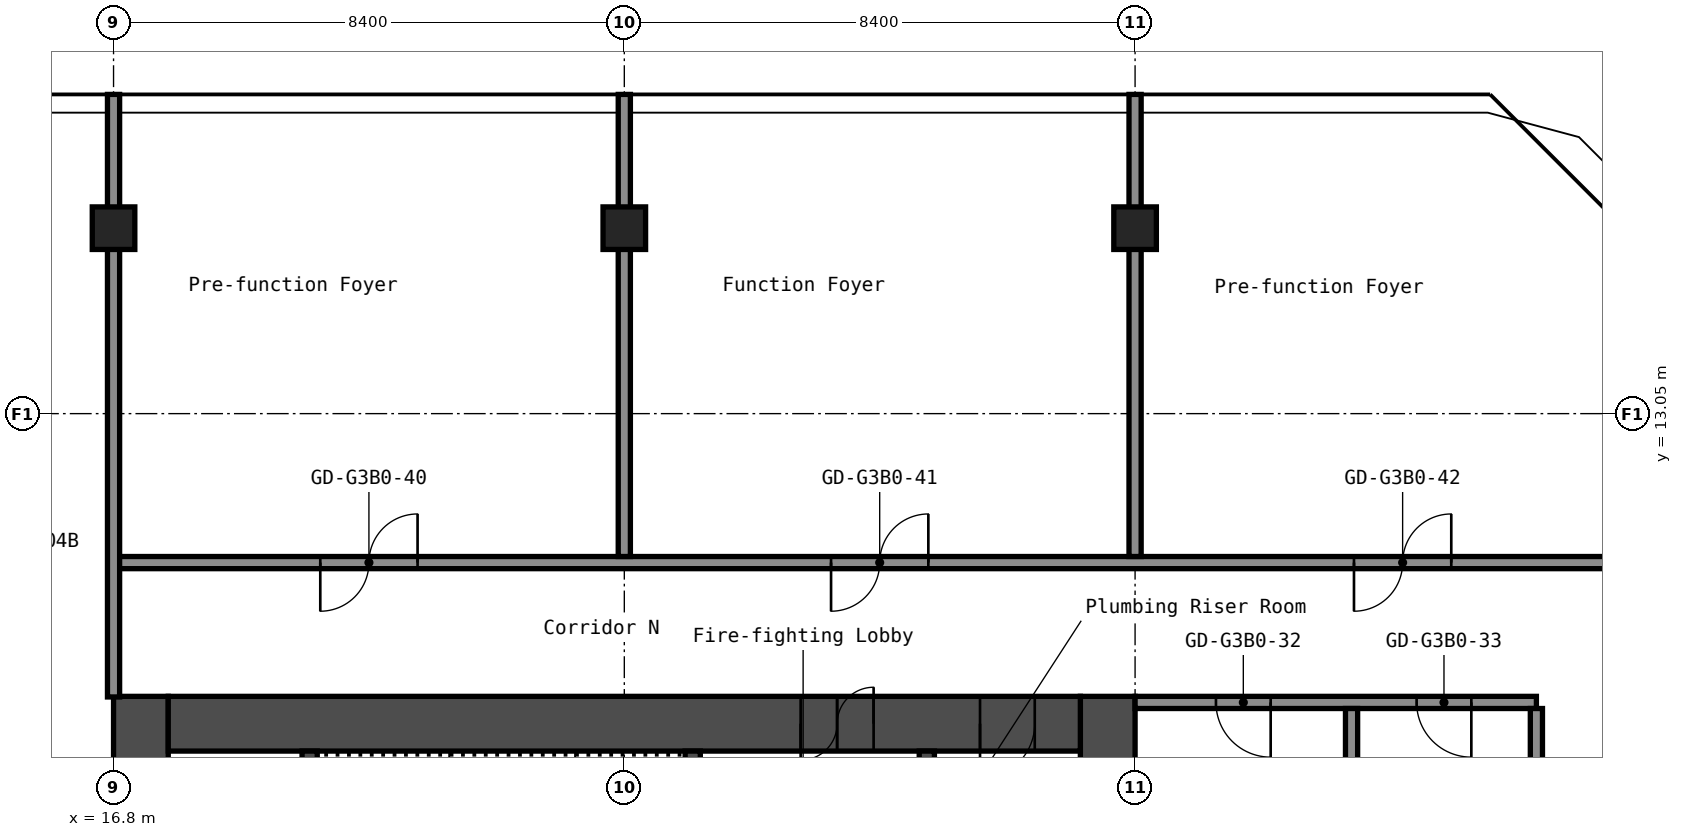
"""IFC4 building model, lengths in metres.
Left out: names, types, materials, properties, quantities, classifications, styles, units other than length and angle.
Written with IfcOpenShell. Run it as: python <this file> out.ifc"""

import sys

from ifc_helpers import new_model, si_unit, direction, frame, frame_2d, origin, origin_2d, place, context, subcontext, project, spatial, rectangle, hollow_rectangle, extrude, element, fill, save


model = new_model("IFC4")
c1 = context("Model", 3, precision=1e-05, world=origin(), true_north=direction((0.0, 1.0)))
c2 = subcontext(c1, "Body", "Model", "MODEL_VIEW")
j1 = project(units=[si_unit("LENGTHUNIT", "METRE"), si_unit("PLANEANGLEUNIT", "RADIAN")], contexts=[c1])
p1 = place(None, origin())
s1 = spatial("IfcSite", under=j1, at=p1, CompositionType="ELEMENT")
p2 = place(p1, origin())
s2 = spatial("IfcBuilding", under=s1, at=p2, CompositionType="ELEMENT")
p3 = place(p2, frame((0.0, 0.0, 134.2)))
s3 = spatial("IfcBuildingStorey", under=s2, at=p3, CompositionType="ELEMENT", Elevation=134.2)
for number, where, z_axis, x_axis in (
    (1, (16.8, 16.1, 0.0), (0.0, 0.0, 1.0), (1.0, 0.0, 0.0)),
    (2, (25.2, 16.1, 0.0), (0.0, 0.0, 1.0), (1.0, 0.0, 0.0)),
    (3, (33.6, 16.1, 0.0), (0.0, 0.0, 1.0), (1.0, 0.0, 0.0)),
):
    element("IfcColumn", number, at=place(p3, frame(where, z_axis=z_axis, x_axis=x_axis)), inside=s3, PredefinedType="COLUMN", context=c2, shape_type="SweptSolid", body=[
        extrude(hollow_rectangle(XDim=0.7, YDim=0.7, WallThickness=0.028, at=origin_2d()), origin(), (0.0, 0.0, 1.0), 2.75),
    ])
p4 = place(p3, frame((17.25, -8.4, 0.0), z_axis=(0.0, 0.0, 1.0), x_axis=(0.0, 1.0, 0.0)))
e4 = element("IfcWall", 4, at=p4, inside=s3, PredefinedType="SHEAR", context=c2, shape_type="SweptSolid", body=[
    extrude(rectangle(XDim=16.8, YDim=0.9, at=frame_2d((8.4, 0.0))), origin(), (0.0, 0.0, 1.0), 2.75),
])
p5 = place(p4, frame((7.1, 0.0, 0.0)))
e5 = element("IfcOpeningElement", 5, at=p5, cuts=e4, PredefinedType="OPENING", context=c2, shape_type="SweptSolid", body=[
    extrude(rectangle(XDim=1.6, YDim=2.1, at=frame_2d((0.8, 1.05))), frame((0.0, 0.46, 0.0), z_axis=(0.0, -1.0, 0.0), x_axis=(1.0, 0.0, 0.0)), (0.0, 0.0, 1.0), 0.92),
])
p6 = place(p3, frame((33.15, -8.4, 0.0), z_axis=(0.0, 0.0, 1.0), x_axis=(0.0, 1.0, 0.0)))
e6 = element("IfcWall", 6, at=p6, inside=s3, PredefinedType="SHEAR", context=c2, shape_type="SweptSolid", body=[
    extrude(rectangle(XDim=16.8, YDim=0.9, at=frame_2d((8.4, 0.0))), origin(), (0.0, 0.0, 1.0), 2.75),
])
p7 = place(p3, frame((17.7, 7.95, 0.0), z_axis=(0.0, 0.0, 1.0), x_axis=(1.0, 0.0, 0.0)))
e7 = element("IfcWall", 7, at=p7, inside=s3, PredefinedType="SHEAR", context=c2, shape_type="SweptSolid", body=[
    extrude(rectangle(XDim=15.0, YDim=0.9, at=frame_2d((7.5, 0.0))), origin(), (0.0, 0.0, 1.0), 2.75),
])
p8 = place(p7, frame((10.4, 0.0, 0.0)))
e8 = element("IfcOpeningElement", 8, at=p8, cuts=e7, PredefinedType="OPENING", context=c2, shape_type="SweptSolid", body=[
    extrude(rectangle(XDim=1.2, YDim=2.1, at=frame_2d((0.6, 1.05))), frame((0.0, 0.46, 0.0), z_axis=(0.0, -1.0, 0.0), x_axis=(1.0, 0.0, 0.0)), (0.0, 0.0, 1.0), 0.92),
])
p9 = place(p7, frame((13.35, 0.0, 0.0)))
e9 = element("IfcOpeningElement", 9, at=p9, cuts=e7, PredefinedType="OPENING", context=c2, shape_type="SweptSolid", body=[
    extrude(rectangle(XDim=0.9, YDim=2.1, at=frame_2d((0.45, 1.05))), frame((0.0, 0.46, 0.0), z_axis=(0.0, -1.0, 0.0), x_axis=(1.0, 0.0, 0.0)), (0.0, 0.0, 1.0), 0.92),
])
p10 = place(p3, frame((20.025, 1.2, 0.0), z_axis=(0.0, 0.0, 1.0), x_axis=(0.0, 1.0, 0.0)))
e10 = element("IfcWall", 10, at=p10, inside=s3, PredefinedType="SHEAR", context=c2, shape_type="SweptSolid", body=[
    extrude(rectangle(XDim=6.3, YDim=0.25, at=frame_2d((3.15, 0.0))), origin(), (0.0, 0.0, 1.0), 2.75),
])
p11 = place(p3, frame((26.325, 3.75, 0.0), z_axis=(0.0, 0.0, 1.0), x_axis=(0.0, 1.0, 0.0)))
e11 = element("IfcWall", 11, at=p11, inside=s3, PredefinedType="SHEAR", context=c2, shape_type="SweptSolid", body=[
    extrude(rectangle(XDim=3.75, YDim=0.25, at=frame_2d((1.875, 0.0))), origin(), (0.0, 0.0, 1.0), 2.75),
])
p12 = place(p11, frame((1.25, 0.0, 0.0)))
e12 = element("IfcOpeningElement", 12, at=p12, cuts=e11, PredefinedType="OPENING", context=c2, shape_type="SweptSolid", body=[
    extrude(rectangle(XDim=1.2, YDim=2.1, at=frame_2d((0.6, 1.05))), frame((0.0, 0.135, 0.0), z_axis=(0.0, -1.0, 0.0), x_axis=(1.0, 0.0, 0.0)), (0.0, 0.0, 1.0), 0.27),
])
p13 = place(p3, frame((30.175, 1.45, 0.0), z_axis=(0.0, 0.0, 1.0), x_axis=(0.0, 1.0, 0.0)))
e13 = element("IfcWall", 13, at=p13, inside=s3, PredefinedType="SHEAR", context=c2, shape_type="SweptSolid", body=[
    extrude(rectangle(XDim=6.05, YDim=0.25, at=frame_2d((3.025, 0.0))), origin(), (0.0, 0.0, 1.0), 2.75),
])
p14 = place(p13, frame((2.625, 0.0, 0.0)))
e14 = element("IfcOpeningElement", 14, at=p14, cuts=e13, PredefinedType="OPENING", context=c2, shape_type="SweptSolid", body=[
    extrude(rectangle(XDim=1.1, YDim=2.1, at=frame_2d((0.55, 1.05))), frame((0.0, 0.135, 0.0), z_axis=(0.0, -1.0, 0.0), x_axis=(1.0, 0.0, 0.0)), (0.0, 0.0, 1.0), 0.27),
])
p15 = place(p3, frame((33.6, 8.3, 0.0), z_axis=(0.0, 0.0, 1.0), x_axis=(1.0, 0.0, 0.0)))
e15 = element("IfcWall", 15, at=p15, inside=s3, PredefinedType="PARTITIONING", context=c2, shape_type="SweptSolid", body=[
    extrude(rectangle(XDim=6.6, YDim=0.2, at=frame_2d((3.3, 0.0))), origin(), (0.0, 0.0, 1.0), 2.75),
])
p16 = place(p15, frame((1.33, 0.0, 0.0)))
e16 = element("IfcOpeningElement", 16, at=p16, cuts=e15, PredefinedType="OPENING", context=c2, shape_type="SweptSolid", body=[
    extrude(rectangle(XDim=0.9, YDim=2.1, at=frame_2d((0.45, 1.05))), frame((0.0, 0.11, 0.0), z_axis=(0.0, -1.0, 0.0), x_axis=(1.0, 0.0, 0.0)), (0.0, 0.0, 1.0), 0.22),
])
p17 = place(p15, frame((4.63, 0.0, 0.0)))
e17 = element("IfcOpeningElement", 17, at=p17, cuts=e15, PredefinedType="OPENING", context=c2, shape_type="SweptSolid", body=[
    extrude(rectangle(XDim=0.9, YDim=2.1, at=frame_2d((0.45, 1.05))), frame((0.0, 0.11, 0.0), z_axis=(0.0, -1.0, 0.0), x_axis=(1.0, 0.0, 0.0)), (0.0, 0.0, 1.0), 0.22),
])
p18 = place(p3, frame((16.8, 10.6, 0.0), z_axis=(0.0, 0.0, 1.0), x_axis=(1.0, 0.0, 0.0)))
e18 = element("IfcWall", 18, at=p18, inside=s3, PredefinedType="PARTITIONING", context=c2, shape_type="SweptSolid", body=[
    extrude(rectangle(XDim=25.9, YDim=0.2, at=frame_2d((12.95, 0.0))), origin(), (0.0, 0.0, 1.0), 2.75),
])
p19 = place(p18, frame((3.4, 0.0, 0.0)))
e19 = element("IfcOpeningElement", 19, at=p19, cuts=e18, PredefinedType="OPENING", context=c2, shape_type="SweptSolid", body=[
    extrude(rectangle(XDim=1.6, YDim=2.1, at=frame_2d((0.8, 1.05))), frame((0.0, 0.11, 0.0), z_axis=(0.0, -1.0, 0.0), x_axis=(1.0, 0.0, 0.0)), (0.0, 0.0, 1.0), 0.22),
])
p20 = place(p18, frame((11.8, 0.0, 0.0)))
e20 = element("IfcOpeningElement", 20, at=p20, cuts=e18, PredefinedType="OPENING", context=c2, shape_type="SweptSolid", body=[
    extrude(rectangle(XDim=1.6, YDim=2.1, at=frame_2d((0.8, 1.05))), frame((0.0, 0.11, 0.0), z_axis=(0.0, -1.0, 0.0), x_axis=(1.0, 0.0, 0.0)), (0.0, 0.0, 1.0), 0.22),
])
p21 = place(p18, frame((20.4, 0.0, 0.0)))
e21 = element("IfcOpeningElement", 21, at=p21, cuts=e18, PredefinedType="OPENING", context=c2, shape_type="SweptSolid", body=[
    extrude(rectangle(XDim=1.6, YDim=2.1, at=frame_2d((0.8, 1.05))), frame((0.0, 0.11, 0.0), z_axis=(0.0, -1.0, 0.0), x_axis=(1.0, 0.0, 0.0)), (0.0, 0.0, 1.0), 0.22),
])
p22 = place(p3, frame((16.8, 8.39, 0.0), z_axis=(0.0, 0.0, 1.0), x_axis=(0.0, 1.0, 0.0)))
e22 = element("IfcWall", 22, at=p22, inside=s3, PredefinedType="PARTITIONING", context=c2, shape_type="SweptSolid", body=[
    extrude(rectangle(XDim=9.91, YDim=0.2, at=frame_2d((4.955, 0.0))), origin(), (0.0, 0.0, 1.0), 2.75),
])
for number, where, z_axis, x_axis in (
    (23, (25.2, 10.7, 0.0), (0.0, 0.0, 1.0), (0.0, 1.0, 0.0)),
    (24, (33.6, 10.7, 0.0), (0.0, 0.0, 1.0), (0.0, 1.0, 0.0)),
):
    element("IfcWall", number, at=place(p3, frame(where, z_axis=z_axis, x_axis=x_axis)), inside=s3, PredefinedType="PARTITIONING", context=c2, shape_type="SweptSolid", body=[
        extrude(rectangle(XDim=7.6, YDim=0.2, at=frame_2d((3.8, 0.0))), origin(), (0.0, 0.0, 1.0), 2.75),
    ])
p23 = place(p3, frame((37.16, 0.0, 0.0), z_axis=(0.0, 0.0, 1.0), x_axis=(0.0, 1.0, 0.0)))
e25 = element("IfcWall", 25, at=p23, inside=s3, PredefinedType="PARTITIONING", context=c2, shape_type="SweptSolid", body=[
    extrude(rectangle(XDim=8.2, YDim=0.2, at=frame_2d((4.1, 0.0))), origin(), (0.0, 0.0, 1.0), 2.75),
])
p24 = place(p3, frame((40.2, -8.2, 0.0), z_axis=(0.0, 0.0, 1.0), x_axis=(0.0, 1.0, 0.0)))
e26 = element("IfcWall", 26, at=p24, inside=s3, PredefinedType="PARTITIONING", context=c2, shape_type="SweptSolid", body=[
    extrude(rectangle(XDim=16.4, YDim=0.2, at=frame_2d((8.2, 0.0))), origin(), (0.0, 0.0, 1.0), 2.75),
])
p25 = place(p8, origin())
e27 = element("IfcDoor", 27, at=p25, inside=s3, OperationType="DOUBLE_DOOR_SINGLE_SWING", PredefinedType="DOOR", context=c2, shape_type="SweptSolid", body=[
    extrude(rectangle(XDim=1.2, YDim=2.1, at=frame_2d((0.6, 1.05))), frame((0.0, 0.025, 0.0), z_axis=(0.0, -1.0, 0.0), x_axis=(1.0, 0.0, 0.0)), (0.0, 0.0, 1.0), 0.05),
])
fill(e8, e27)
p26 = place(p9, origin())
e28 = element("IfcDoor", 28, at=p26, inside=s3, OperationType="SINGLE_SWING_LEFT", PredefinedType="DOOR", context=c2, shape_type="SweptSolid", body=[
    extrude(rectangle(XDim=0.9, YDim=2.1, at=frame_2d((0.45, 1.05))), frame((0.0, 0.025, 0.0), z_axis=(0.0, -1.0, 0.0), x_axis=(1.0, 0.0, 0.0)), (0.0, 0.0, 1.0), 0.05),
])
fill(e9, e28)
p27 = place(p16, origin())
e29 = element("IfcDoor", 29, at=p27, inside=s3, OperationType="SINGLE_SWING_RIGHT", PredefinedType="DOOR", context=c2, shape_type="SweptSolid", body=[
    extrude(rectangle(XDim=0.9, YDim=2.1, at=frame_2d((0.45, 1.05))), frame((0.0, 0.025, 0.0), z_axis=(0.0, -1.0, 0.0), x_axis=(1.0, 0.0, 0.0)), (0.0, 0.0, 1.0), 0.05),
])
fill(e16, e29)
p28 = place(p17, origin())
e30 = element("IfcDoor", 30, at=p28, inside=s3, OperationType="SINGLE_SWING_RIGHT", PredefinedType="DOOR", context=c2, shape_type="SweptSolid", body=[
    extrude(rectangle(XDim=0.9, YDim=2.1, at=frame_2d((0.45, 1.05))), frame((0.0, 0.025, 0.0), z_axis=(0.0, -1.0, 0.0), x_axis=(1.0, 0.0, 0.0)), (0.0, 0.0, 1.0), 0.05),
])
fill(e17, e30)
p29 = place(p19, origin())
e31 = element("IfcDoor", 31, at=p29, inside=s3, OperationType="DOUBLE_DOOR_SINGLE_SWING", PredefinedType="DOOR", context=c2, shape_type="SweptSolid", body=[
    extrude(rectangle(XDim=1.6, YDim=2.1, at=frame_2d((0.8, 1.05))), frame((0.0, 0.025, 0.0), z_axis=(0.0, -1.0, 0.0), x_axis=(1.0, 0.0, 0.0)), (0.0, 0.0, 1.0), 0.05),
])
fill(e19, e31)
p30 = place(p20, origin())
e32 = element("IfcDoor", 32, at=p30, inside=s3, OperationType="DOUBLE_DOOR_SINGLE_SWING", PredefinedType="DOOR", context=c2, shape_type="SweptSolid", body=[
    extrude(rectangle(XDim=1.6, YDim=2.1, at=frame_2d((0.8, 1.05))), frame((0.0, 0.025, 0.0), z_axis=(0.0, -1.0, 0.0), x_axis=(1.0, 0.0, 0.0)), (0.0, 0.0, 1.0), 0.05),
])
fill(e20, e32)
p31 = place(p21, origin())
e33 = element("IfcDoor", 33, at=p31, inside=s3, OperationType="DOUBLE_DOOR_SINGLE_SWING", PredefinedType="DOOR", context=c2, shape_type="SweptSolid", body=[
    extrude(rectangle(XDim=1.6, YDim=2.1, at=frame_2d((0.8, 1.05))), frame((0.0, 0.025, 0.0), z_axis=(0.0, -1.0, 0.0), x_axis=(1.0, 0.0, 0.0)), (0.0, 0.0, 1.0), 0.05),
])
fill(e21, e33)
save(model, sys.argv[1])
